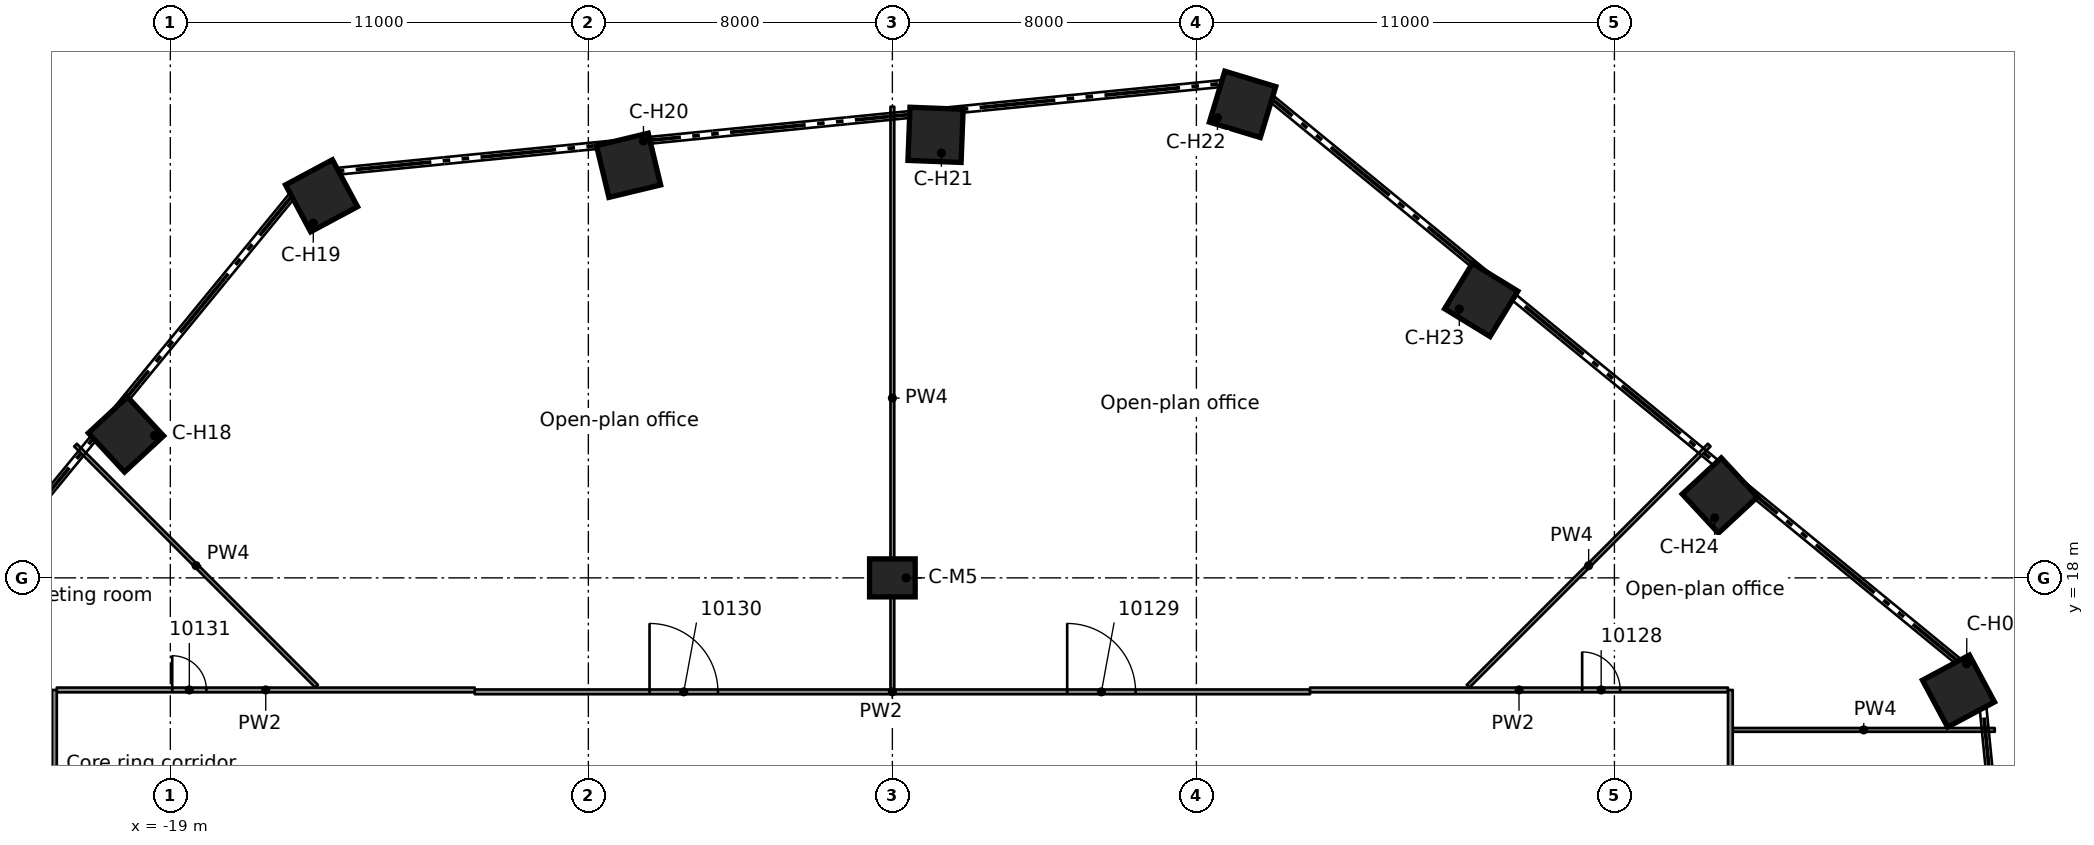
"""IFC4 building model, lengths in metres.
Left out: names, types, materials, properties, quantities, classifications, styles, units other than length and angle.
Written with IfcOpenShell. Run it as: python <this file> out.ifc"""

import sys

from ifc_helpers import new_model, si_unit, direction, frame, frame_2d, origin, origin_2d, place, context, subcontext, project, spatial, rectangle, extrude, element, fill, save


model = new_model("IFC4")
c1 = context("Model", 3, precision=1e-05, world=origin(), true_north=direction((0.0, 1.0)))
c2 = subcontext(c1, "Body", "Model", "MODEL_VIEW")
j1 = project(units=[si_unit("LENGTHUNIT", "METRE"), si_unit("PLANEANGLEUNIT", "RADIAN")], contexts=[c1])
p1 = place(None, origin())
s1 = spatial("IfcSite", under=j1, at=p1, CompositionType="ELEMENT")
p2 = place(p1, origin())
s2 = spatial("IfcBuilding", under=s1, at=p2, CompositionType="ELEMENT")
p3 = place(p2, frame((0.0, 0.0, 51.3)))
s3 = spatial("IfcBuildingStorey", under=s2, at=p3, CompositionType="ELEMENT", Elevation=51.3)
for number, where, z_axis, x_axis in (
    (1, (28.054, 15.021, 0.0), (0.0, 0.0, 1.0), (0.882, 0.472, 0.0)),
    (2, (-20.167, 21.774, 0.0), (0.0, 0.0, 1.0), (-0.68, 0.734, 0.0)),
    (3, (-15.021, 28.054, 0.0), (0.0, 0.0, 1.0), (-0.472, 0.882, 0.0)),
    (4, (-6.942, 28.856, 0.0), (0.0, 0.0, 1.0), (-0.234, 0.972, 0.0)),
    (5, (1.136, 29.657, 0.0), (0.0, 0.0, 1.0), (0.038, 0.999, 0.0)),
    (6, (9.215, 30.459, 0.0), (0.0, 0.0, 1.0), (0.29, 0.957, 0.0)),
    (7, (15.495, 25.313, 0.0), (0.0, 0.0, 1.0), (0.522, 0.853, 0.0)),
    (8, (21.774, 20.167, 0.0), (0.0, 0.0, 1.0), (0.734, 0.68, 0.0)),
):
    element("IfcColumn", number, at=place(p3, frame(where, z_axis=z_axis, x_axis=x_axis)), inside=s3, PredefinedType="COLUMN", context=c2, shape_type="SweptSolid", body=[
        extrude(rectangle(XDim=1.4, YDim=1.4, at=origin_2d()), origin(), (0.0, 0.0, 1.0), 3.5),
    ])
p4 = place(p3, frame((0.0, 18.0, 0.0), z_axis=(0.0, 0.0, 1.0), x_axis=(1.0, 0.0, 0.0)))
e9 = element("IfcColumn", 9, at=p4, inside=s3, PredefinedType="COLUMN", context=c2, shape_type="SweptSolid", body=[
    extrude(rectangle(XDim=1.2, YDim=1.0, at=origin_2d()), origin(), (0.0, 0.0, 1.0), 3.5),
])
p5 = place(p3, frame((-21.495, 21.494, 0.0), z_axis=(0.0, 0.0, 1.0), x_axis=(0.707120384757, -0.707093177355, 0.0)))
e10 = element("IfcWall", 10, at=p5, inside=s3, PredefinedType="PARTITIONING", context=c2, shape_type="SweptSolid", body=[
    extrude(rectangle(XDim=8.973, YDim=0.1, at=frame_2d((4.487, 0.0))), origin(), (0.0, 0.0, 1.0), 2.445),
])
p6 = place(p3, frame((22.113, 14.0, 0.0), z_axis=(0.0, 0.0, 1.0), x_axis=(1.0, 0.0, 0.0)))
e11 = element("IfcWall", 11, at=p6, inside=s3, PredefinedType="PARTITIONING", context=c2, shape_type="SweptSolid", body=[
    extrude(rectangle(XDim=6.896, YDim=0.1, at=frame_2d((3.448, 0.0))), origin(), (0.0, 0.0, 1.0), 2.445),
])
p7 = place(p3, frame((-10.99, 15.001, 0.0), z_axis=(0.0, 0.0, 1.0), x_axis=(1.0, 0.0, 0.0)))
e12 = element("IfcWall", 12, at=p7, inside=s3, PredefinedType="PARTITIONING", context=c2, shape_type="SweptSolid", body=[
    extrude(rectangle(XDim=21.98, YDim=0.125, at=frame_2d((10.99, 0.0))), origin(), (0.0, 0.0, 1.0), 3.08),
])
p8 = place(p7, frame((15.59, 0.0, 0.0)))
e13 = element("IfcOpeningElement", 13, at=p8, cuts=e12, PredefinedType="OPENING", context=c2, shape_type="SweptSolid", body=[
    extrude(rectangle(XDim=1.8, YDim=2.1, at=frame_2d((0.9, 1.05))), frame((0.0, 0.073, 0.0), z_axis=(0.0, -1.0, 0.0), x_axis=(1.0, 0.0, 0.0)), (0.0, 0.0, 1.0), 0.145),
])
p9 = place(p7, frame((4.6, 0.0, 0.0)))
e14 = element("IfcOpeningElement", 14, at=p9, cuts=e12, PredefinedType="OPENING", context=c2, shape_type="SweptSolid", body=[
    extrude(rectangle(XDim=1.8, YDim=2.1, at=frame_2d((0.9, 1.05))), frame((0.0, 0.073, 0.0), z_axis=(0.0, -1.0, 0.0), x_axis=(1.0, 0.0, 0.0)), (0.0, 0.0, 1.0), 0.145),
])
p10 = place(p3, frame((-21.988, 15.051, 0.0), z_axis=(0.0, 0.0, 1.0), x_axis=(1.0, 0.0, 0.0)))
e15 = element("IfcWall", 15, at=p10, inside=s3, PredefinedType="PARTITIONING", context=c2, shape_type="SweptSolid", body=[
    extrude(rectangle(XDim=10.997, YDim=0.125, at=frame_2d((5.499, 0.0))), origin(), (0.0, 0.0, 1.0), 3.08),
])
p11 = place(p10, frame((3.038, 0.0, 0.0)))
e16 = element("IfcOpeningElement", 16, at=p11, cuts=e15, PredefinedType="OPENING", context=c2, shape_type="SweptSolid", body=[
    extrude(rectangle(XDim=0.9, YDim=2.1, at=frame_2d((0.45, 1.05))), frame((0.0, 0.073, 0.0), z_axis=(0.0, -1.0, 0.0), x_axis=(1.0, 0.0, 0.0)), (0.0, 0.0, 1.0), 0.145),
])
p12 = place(p3, frame((10.991, 15.051, 0.0), z_axis=(0.0, 0.0, 1.0), x_axis=(1.0, 0.0, 0.0)))
e17 = element("IfcWall", 17, at=p12, inside=s3, PredefinedType="PARTITIONING", context=c2, shape_type="SweptSolid", body=[
    extrude(rectangle(XDim=10.997, YDim=0.125, at=frame_2d((5.499, 0.0))), origin(), (0.0, 0.0, 1.0), 3.08),
])
p13 = place(p12, frame((7.16, 0.0, 0.0)))
e18 = element("IfcOpeningElement", 18, at=p13, cuts=e17, PredefinedType="OPENING", context=c2, shape_type="SweptSolid", body=[
    extrude(rectangle(XDim=1.0, YDim=2.1, at=frame_2d((0.5, 1.05))), frame((0.0, 0.073, 0.0), z_axis=(0.0, -1.0, 0.0), x_axis=(1.0, 0.0, 0.0)), (0.0, 0.0, 1.0), 0.145),
])
p14 = place(p3, frame((15.149, 15.149, 0.0), z_axis=(0.0, 0.0, 1.0), x_axis=(0.707106781187, 0.707106781187, 0.0)))
e19 = element("IfcWall", 19, at=p14, inside=s3, PredefinedType="PARTITIONING", context=c2, shape_type="SweptSolid", body=[
    extrude(rectangle(XDim=8.975, YDim=0.1, at=frame_2d((4.487, 0.0))), origin(), (0.0, 0.0, 1.0), 2.445),
])
p15 = place(p3, frame((22.051, 15.05, 0.0), z_axis=(0.0, 0.0, 1.0), x_axis=(0.0, -1.0, 0.0)))
e20 = element("IfcWall", 20, at=p15, inside=s3, PredefinedType="PARTITIONING", context=c2, shape_type="SweptSolid", body=[
    extrude(rectangle(XDim=25.257, YDim=0.125, at=frame_2d((12.628, 0.0))), origin(), (0.0, 0.0, 1.0), 3.08),
])
p16 = place(p15, frame((18.754, 0.0, 0.0)))
e21 = element("IfcOpeningElement", 21, at=p16, cuts=e20, PredefinedType="OPENING", context=c2, shape_type="SweptSolid", body=[
    extrude(rectangle(XDim=0.9, YDim=2.1, at=frame_2d((0.45, 1.05))), frame((0.0, 0.073, 0.0), z_axis=(0.0, -1.0, 0.0), x_axis=(1.0, 0.0, 0.0)), (0.0, 0.0, 1.0), 0.145),
])
p17 = place(p15, frame((10.65, 0.0, 0.0)))
e22 = element("IfcOpeningElement", 22, at=p17, cuts=e20, PredefinedType="OPENING", context=c2, shape_type="SweptSolid", body=[
    extrude(rectangle(XDim=0.9, YDim=2.1, at=frame_2d((0.45, 1.05))), frame((0.0, 0.073, 0.0), z_axis=(0.0, -1.0, 0.0), x_axis=(1.0, 0.0, 0.0)), (0.0, 0.0, 1.0), 0.145),
])
p18 = place(p15, frame((6.65, 0.0, 0.0)))
e23 = element("IfcOpeningElement", 23, at=p18, cuts=e20, PredefinedType="OPENING", context=c2, shape_type="SweptSolid", body=[
    extrude(rectangle(XDim=0.9, YDim=2.1, at=frame_2d((0.45, 1.05))), frame((0.0, 0.073, 0.0), z_axis=(0.0, -1.0, 0.0), x_axis=(1.0, 0.0, 0.0)), (0.0, 0.0, 1.0), 0.145),
])
p19 = place(p3, frame((0.0, 15.063, 0.0), z_axis=(0.0, 0.0, 1.0), x_axis=(0.0, 1.0, 0.0)))
e24 = element("IfcWall", 24, at=p19, inside=s3, PredefinedType="PARTITIONING", context=c2, shape_type="SweptSolid", body=[
    extrude(rectangle(XDim=15.335, YDim=0.1, at=frame_2d((7.667, 0.0))), origin(), (0.0, 0.0, 1.0), 2.445),
])
p20 = place(p3, frame((-22.05, -13.696, 0.0), z_axis=(0.0, 0.0, 1.0), x_axis=(0.0, 1.0, 0.0)))
e25 = element("IfcWall", 25, at=p20, inside=s3, PredefinedType="PARTITIONING", context=c2, shape_type="SweptSolid", body=[
    extrude(rectangle(XDim=28.747, YDim=0.125, at=frame_2d((14.374, 0.0))), origin(), (0.0, 0.0, 1.0), 3.08),
])
p21 = place(p20, frame((6.1, 0.0, 0.0)))
e26 = element("IfcOpeningElement", 26, at=p21, cuts=e25, PredefinedType="OPENING", context=c2, shape_type="SweptSolid", body=[
    extrude(rectangle(XDim=1.8, YDim=2.1, at=frame_2d((0.9, 1.05))), frame((0.0, 0.073, 0.0), z_axis=(0.0, -1.0, 0.0), x_axis=(1.0, 0.0, 0.0)), (0.0, 0.0, 1.0), 0.145),
])
p22 = place(p20, frame((20.198, 0.0, 0.0)))
e27 = element("IfcOpeningElement", 27, at=p22, cuts=e25, PredefinedType="OPENING", context=c2, shape_type="SweptSolid", body=[
    extrude(rectangle(XDim=1.1, YDim=2.1, at=frame_2d((0.55, 1.05))), frame((0.0, 0.073, 0.0), z_axis=(0.0, -1.0, 0.0), x_axis=(1.0, 0.0, 0.0)), (0.0, 0.0, 1.0), 0.145),
])
p23 = place(p13, origin())
e28 = element("IfcDoor", 28, at=p23, inside=s3, OperationType="SINGLE_SWING_RIGHT", PredefinedType="DOOR", context=c2, shape_type="SweptSolid", body=[
    extrude(rectangle(XDim=1.0, YDim=2.1, at=frame_2d((0.5, 1.05))), frame((0.0, 0.025, 0.0), z_axis=(0.0, -1.0, 0.0), x_axis=(1.0, 0.0, 0.0)), (0.0, 0.0, 1.0), 0.05),
])
fill(e18, e28)
p24 = place(p8, origin())
e29 = element("IfcDoor", 29, at=p24, inside=s3, OperationType="DOUBLE_DOOR_SINGLE_SWING", PredefinedType="DOOR", context=c2, shape_type="SweptSolid", body=[
    extrude(rectangle(XDim=1.8, YDim=2.1, at=frame_2d((0.9, 1.05))), frame((0.0, 0.025, 0.0), z_axis=(0.0, -1.0, 0.0), x_axis=(1.0, 0.0, 0.0)), (0.0, 0.0, 1.0), 0.05),
])
fill(e13, e29)
p25 = place(p9, origin())
e30 = element("IfcDoor", 30, at=p25, inside=s3, OperationType="DOUBLE_DOOR_SINGLE_SWING", PredefinedType="DOOR", context=c2, shape_type="SweptSolid", body=[
    extrude(rectangle(XDim=1.8, YDim=2.1, at=frame_2d((0.9, 1.05))), frame((0.0, 0.025, 0.0), z_axis=(0.0, -1.0, 0.0), x_axis=(1.0, 0.0, 0.0)), (0.0, 0.0, 1.0), 0.05),
])
fill(e14, e30)
p26 = place(p11, origin())
e31 = element("IfcDoor", 31, at=p26, inside=s3, OperationType="SINGLE_SWING_LEFT", PredefinedType="DOOR", context=c2, shape_type="SweptSolid", body=[
    extrude(rectangle(XDim=0.9, YDim=2.1, at=frame_2d((0.45, 1.05))), frame((0.0, 0.025, 0.0), z_axis=(0.0, -1.0, 0.0), x_axis=(1.0, 0.0, 0.0)), (0.0, 0.0, 1.0), 0.05),
])
fill(e16, e31)
save(model, sys.argv[1])
